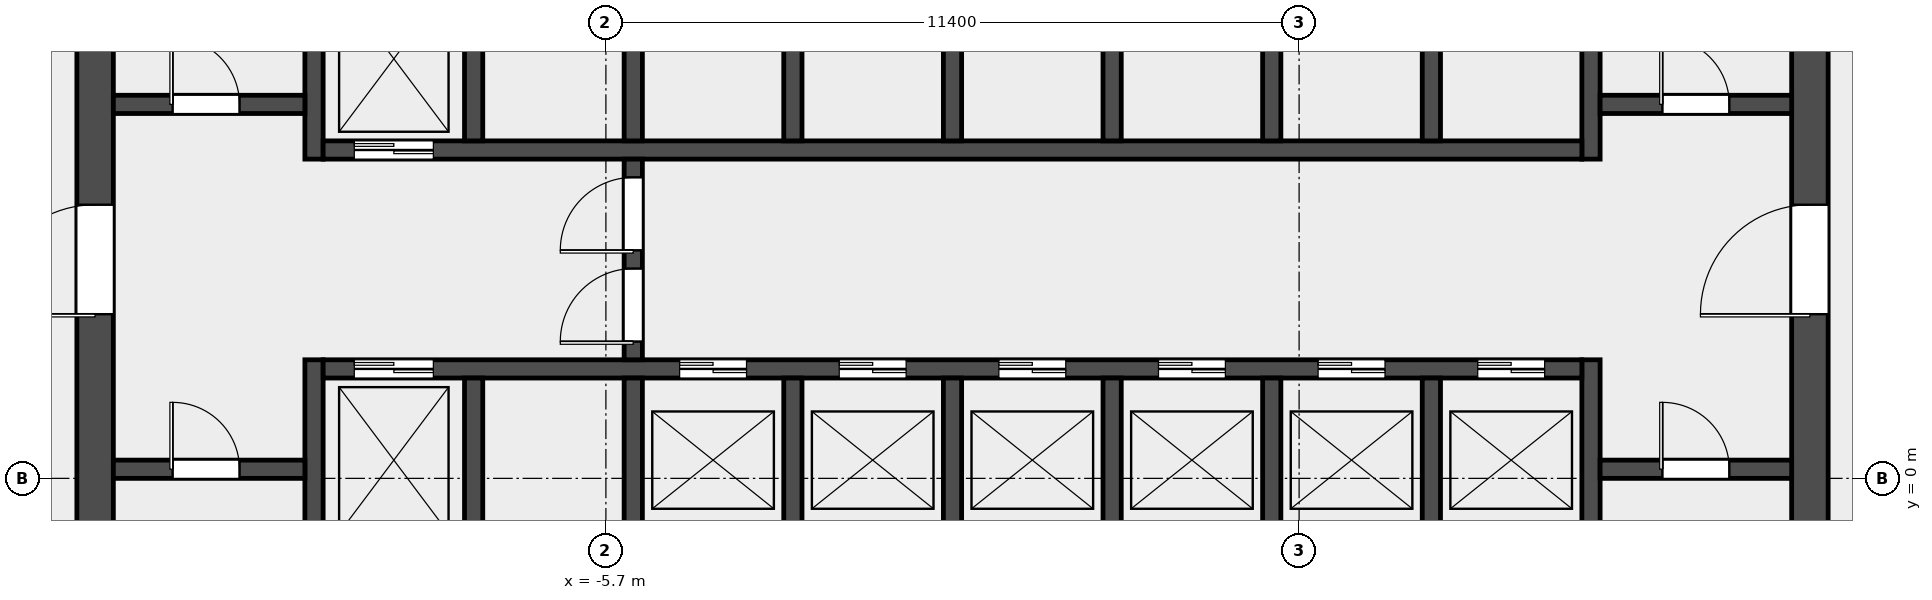
"""IFC4 building model, lengths in metres.
Left out: names, types, materials, properties, quantities, classifications, styles, units other than length and angle.
Written with IfcOpenShell. Run it as: python <this file> out.ifc"""

import sys

from ifc_helpers import new_model, si_unit, direction, frame, frame_2d, origin, place, context, subcontext, project, spatial, rectangle, extrude, element, fill, save


model = new_model("IFC4")
c1 = context("Model", 3, precision=1e-05, world=origin(), true_north=direction((0.0, 1.0)))
c2 = subcontext(c1, "Body", "Model", "MODEL_VIEW")
j1 = project(units=[si_unit("LENGTHUNIT", "METRE"), si_unit("PLANEANGLEUNIT", "RADIAN")], contexts=[c1])
p1 = place(None, origin())
s1 = spatial("IfcSite", under=j1, at=p1, CompositionType="ELEMENT")
p2 = place(p1, origin())
s2 = spatial("IfcBuilding", under=s1, at=p2, CompositionType="ELEMENT")
p3 = place(p2, frame((0.0, 0.0, 35.8)))
s3 = spatial("IfcBuildingStorey", under=s2, at=p3, CompositionType="ELEMENT", Elevation=35.8)
p4 = place(p3, frame((-14.1, -6.6, 0.0), z_axis=(0.0, 0.0, 1.0), x_axis=(0.0, 1.0, 0.0)))
e1 = element("IfcWall", 1, at=p4, inside=s3, PredefinedType="SHEAR", context=c2, shape_type="SweptSolid", body=[
    extrude(rectangle(XDim=19.5, YDim=0.6, at=frame_2d((9.75, 0.0))), origin(), (0.0, 0.0, 1.0), 4.5),
])
p5 = place(p4, frame((9.3, 0.0, 0.0)))
e2 = element("IfcOpeningElement", 2, at=p5, cuts=e1, PredefinedType="OPENING", context=c2, shape_type="SweptSolid", body=[
    extrude(rectangle(XDim=1.8, YDim=2.1, at=frame_2d((0.9, 1.05))), frame((0.0, 0.312, 0.0), z_axis=(0.0, -1.0, 0.0), x_axis=(1.0, 0.0, 0.0)), (0.0, 0.0, 1.0), 0.624),
])
p6 = place(p3, frame((14.1, -6.6, 0.0), z_axis=(0.0, 0.0, 1.0), x_axis=(0.0, 1.0, 0.0)))
e3 = element("IfcWall", 3, at=p6, inside=s3, PredefinedType="SHEAR", context=c2, shape_type="SweptSolid", body=[
    extrude(rectangle(XDim=19.5, YDim=0.6, at=frame_2d((9.75, 0.0))), origin(), (0.0, 0.0, 1.0), 4.5),
])
p7 = place(p6, frame((9.3, 0.0, 0.0)))
e4 = element("IfcOpeningElement", 4, at=p7, cuts=e3, PredefinedType="OPENING", context=c2, shape_type="SweptSolid", body=[
    extrude(rectangle(XDim=1.8, YDim=2.1, at=frame_2d((0.9, 1.05))), frame((0.0, 0.312, 0.0), z_axis=(0.0, -1.0, 0.0), x_axis=(1.0, 0.0, 0.0)), (0.0, 0.0, 1.0), 0.624),
])
p8 = place(p3, frame((-10.5, -6.6, 0.0), z_axis=(0.0, 0.0, 1.0), x_axis=(0.0, 1.0, 0.0)))
e5 = element("IfcWall", 5, at=p8, inside=s3, PredefinedType="SHEAR", context=c2, shape_type="SweptSolid", body=[
    extrude(rectangle(XDim=8.55, YDim=0.3, at=frame_2d((4.275, 0.0))), origin(), (0.0, 0.0, 1.0), 4.5),
])
p9 = place(p3, frame((-10.5, 5.25, 0.0), z_axis=(0.0, 0.0, 1.0), x_axis=(0.0, 1.0, 0.0)))
e6 = element("IfcWall", 6, at=p9, inside=s3, PredefinedType="SHEAR", context=c2, shape_type="SweptSolid", body=[
    extrude(rectangle(XDim=7.65, YDim=0.3, at=frame_2d((3.825, 0.0))), origin(), (0.0, 0.0, 1.0), 4.5),
])
p10 = place(p3, frame((10.5, -6.6, 0.0), z_axis=(0.0, 0.0, 1.0), x_axis=(0.0, 1.0, 0.0)))
e7 = element("IfcWall", 7, at=p10, inside=s3, PredefinedType="SHEAR", context=c2, shape_type="SweptSolid", body=[
    extrude(rectangle(XDim=8.55, YDim=0.3, at=frame_2d((4.275, 0.0))), origin(), (0.0, 0.0, 1.0), 4.5),
])
p11 = place(p3, frame((10.5, 5.25, 0.0), z_axis=(0.0, 0.0, 1.0), x_axis=(0.0, 1.0, 0.0)))
e8 = element("IfcWall", 8, at=p11, inside=s3, PredefinedType="SHEAR", context=c2, shape_type="SweptSolid", body=[
    extrude(rectangle(XDim=7.65, YDim=0.3, at=frame_2d((3.825, 0.0))), origin(), (0.0, 0.0, 1.0), 4.5),
])
p12 = place(p3, frame((-13.8, 0.15, 0.0), z_axis=(0.0, 0.0, 1.0), x_axis=(1.0, 0.0, 0.0)))
e9 = element("IfcWall", 9, at=p12, inside=s3, PredefinedType="SOLIDWALL", context=c2, shape_type="SweptSolid", body=[
    extrude(rectangle(XDim=3.15, YDim=0.3, at=frame_2d((1.575, 0.0))), origin(), (0.0, 0.0, 1.0), 4.5),
])
p13 = place(p12, frame((0.975, 0.0, 0.0)))
e10 = element("IfcOpeningElement", 10, at=p13, cuts=e9, PredefinedType="OPENING", context=c2, shape_type="SweptSolid", body=[
    extrude(rectangle(XDim=1.1, YDim=2.1, at=frame_2d((0.55, 1.05))), frame((0.0, 0.162, 0.0), z_axis=(0.0, -1.0, 0.0), x_axis=(1.0, 0.0, 0.0)), (0.0, 0.0, 1.0), 0.324),
])
p14 = place(p3, frame((-13.8, 6.15, 0.0), z_axis=(0.0, 0.0, 1.0), x_axis=(1.0, 0.0, 0.0)))
e11 = element("IfcWall", 11, at=p14, inside=s3, PredefinedType="SOLIDWALL", context=c2, shape_type="SweptSolid", body=[
    extrude(rectangle(XDim=3.15, YDim=0.3, at=frame_2d((1.575, 0.0))), origin(), (0.0, 0.0, 1.0), 4.5),
])
p15 = place(p14, frame((0.975, 0.0, 0.0)))
e12 = element("IfcOpeningElement", 12, at=p15, cuts=e11, PredefinedType="OPENING", context=c2, shape_type="SweptSolid", body=[
    extrude(rectangle(XDim=1.1, YDim=2.1, at=frame_2d((0.55, 1.05))), frame((0.0, 0.162, 0.0), z_axis=(0.0, -1.0, 0.0), x_axis=(1.0, 0.0, 0.0)), (0.0, 0.0, 1.0), 0.324),
])
p16 = place(p3, frame((10.65, 0.15, 0.0), z_axis=(0.0, 0.0, 1.0), x_axis=(1.0, 0.0, 0.0)))
e13 = element("IfcWall", 13, at=p16, inside=s3, PredefinedType="SOLIDWALL", context=c2, shape_type="SweptSolid", body=[
    extrude(rectangle(XDim=3.15, YDim=0.3, at=frame_2d((1.575, 0.0))), origin(), (0.0, 0.0, 1.0), 4.5),
])
p17 = place(p16, frame((1.025, 0.0, 0.0)))
e14 = element("IfcOpeningElement", 14, at=p17, cuts=e13, PredefinedType="OPENING", context=c2, shape_type="SweptSolid", body=[
    extrude(rectangle(XDim=1.1, YDim=2.1, at=frame_2d((0.55, 1.05))), frame((0.0, 0.162, 0.0), z_axis=(0.0, -1.0, 0.0), x_axis=(1.0, 0.0, 0.0)), (0.0, 0.0, 1.0), 0.324),
])
p18 = place(p3, frame((10.65, 6.15, 0.0), z_axis=(0.0, 0.0, 1.0), x_axis=(1.0, 0.0, 0.0)))
e15 = element("IfcWall", 15, at=p18, inside=s3, PredefinedType="SOLIDWALL", context=c2, shape_type="SweptSolid", body=[
    extrude(rectangle(XDim=3.15, YDim=0.3, at=frame_2d((1.575, 0.0))), origin(), (0.0, 0.0, 1.0), 4.5),
])
p19 = place(p18, frame((1.025, 0.0, 0.0)))
e16 = element("IfcOpeningElement", 16, at=p19, cuts=e15, PredefinedType="OPENING", context=c2, shape_type="SweptSolid", body=[
    extrude(rectangle(XDim=1.1, YDim=2.1, at=frame_2d((0.55, 1.05))), frame((0.0, 0.162, 0.0), z_axis=(0.0, -1.0, 0.0), x_axis=(1.0, 0.0, 0.0)), (0.0, 0.0, 1.0), 0.324),
])
p20 = place(p3, frame((-10.35, 1.8, 0.0), z_axis=(0.0, 0.0, 1.0), x_axis=(1.0, 0.0, 0.0)))
e17 = element("IfcWall", 17, at=p20, inside=s3, PredefinedType="SOLIDWALL", context=c2, shape_type="SweptSolid", body=[
    extrude(rectangle(XDim=20.7, YDim=0.3, at=frame_2d((10.35, 0.0))), origin(), (0.0, 0.0, 1.0), 4.5),
])
p21 = place(p20, frame((0.512, 0.0, 0.0)))
e18 = element("IfcOpeningElement", 18, at=p21, cuts=e17, PredefinedType="OPENING", context=c2, shape_type="SweptSolid", body=[
    extrude(rectangle(XDim=1.3, YDim=2.1, at=frame_2d((0.65, 1.05))), frame((0.0, 0.162, 0.0), z_axis=(0.0, -1.0, 0.0), x_axis=(1.0, 0.0, 0.0)), (0.0, 0.0, 1.0), 0.324),
])
p22 = place(p20, frame((5.863, 0.0, 0.0)))
e19 = element("IfcOpeningElement", 19, at=p22, cuts=e17, PredefinedType="OPENING", context=c2, shape_type="SweptSolid", body=[
    extrude(rectangle(XDim=1.1, YDim=2.1, at=frame_2d((0.55, 1.05))), frame((0.0, 0.162, 0.0), z_axis=(0.0, -1.0, 0.0), x_axis=(1.0, 0.0, 0.0)), (0.0, 0.0, 1.0), 0.324),
])
p23 = place(p20, frame((8.488, 0.0, 0.0)))
e20 = element("IfcOpeningElement", 20, at=p23, cuts=e17, PredefinedType="OPENING", context=c2, shape_type="SweptSolid", body=[
    extrude(rectangle(XDim=1.1, YDim=2.1, at=frame_2d((0.55, 1.05))), frame((0.0, 0.162, 0.0), z_axis=(0.0, -1.0, 0.0), x_axis=(1.0, 0.0, 0.0)), (0.0, 0.0, 1.0), 0.324),
])
p24 = place(p20, frame((11.113, 0.0, 0.0)))
e21 = element("IfcOpeningElement", 21, at=p24, cuts=e17, PredefinedType="OPENING", context=c2, shape_type="SweptSolid", body=[
    extrude(rectangle(XDim=1.1, YDim=2.1, at=frame_2d((0.55, 1.05))), frame((0.0, 0.162, 0.0), z_axis=(0.0, -1.0, 0.0), x_axis=(1.0, 0.0, 0.0)), (0.0, 0.0, 1.0), 0.324),
])
p25 = place(p20, frame((13.738, 0.0, 0.0)))
e22 = element("IfcOpeningElement", 22, at=p25, cuts=e17, PredefinedType="OPENING", context=c2, shape_type="SweptSolid", body=[
    extrude(rectangle(XDim=1.1, YDim=2.1, at=frame_2d((0.55, 1.05))), frame((0.0, 0.162, 0.0), z_axis=(0.0, -1.0, 0.0), x_axis=(1.0, 0.0, 0.0)), (0.0, 0.0, 1.0), 0.324),
])
p26 = place(p20, frame((16.363, 0.0, 0.0)))
e23 = element("IfcOpeningElement", 23, at=p26, cuts=e17, PredefinedType="OPENING", context=c2, shape_type="SweptSolid", body=[
    extrude(rectangle(XDim=1.1, YDim=2.1, at=frame_2d((0.55, 1.05))), frame((0.0, 0.162, 0.0), z_axis=(0.0, -1.0, 0.0), x_axis=(1.0, 0.0, 0.0)), (0.0, 0.0, 1.0), 0.324),
])
p27 = place(p20, frame((18.988, 0.0, 0.0)))
e24 = element("IfcOpeningElement", 24, at=p27, cuts=e17, PredefinedType="OPENING", context=c2, shape_type="SweptSolid", body=[
    extrude(rectangle(XDim=1.1, YDim=2.1, at=frame_2d((0.55, 1.05))), frame((0.0, 0.162, 0.0), z_axis=(0.0, -1.0, 0.0), x_axis=(1.0, 0.0, 0.0)), (0.0, 0.0, 1.0), 0.324),
])
p28 = place(p3, frame((-10.35, 5.4, 0.0), z_axis=(0.0, 0.0, 1.0), x_axis=(1.0, 0.0, 0.0)))
e25 = element("IfcWall", 25, at=p28, inside=s3, PredefinedType="SOLIDWALL", context=c2, shape_type="SweptSolid", body=[
    extrude(rectangle(XDim=20.7, YDim=0.3, at=frame_2d((10.35, 0.0))), origin(), (0.0, 0.0, 1.0), 4.5),
])
p29 = place(p28, frame((0.512, 0.0, 0.0)))
e26 = element("IfcOpeningElement", 26, at=p29, cuts=e25, PredefinedType="OPENING", context=c2, shape_type="SweptSolid", body=[
    extrude(rectangle(XDim=1.3, YDim=2.1, at=frame_2d((0.65, 1.05))), frame((0.0, 0.162, 0.0), z_axis=(0.0, -1.0, 0.0), x_axis=(1.0, 0.0, 0.0)), (0.0, 0.0, 1.0), 0.324),
])
for number, where, z_axis, x_axis in (
    (27, (-7.875, -1.05, 0.0), (0.0, 0.0, 1.0), (0.0, 1.0, 0.0)),
    (28, (-5.25, -1.05, 0.0), (0.0, 0.0, 1.0), (0.0, 1.0, 0.0)),
    (29, (-2.625, -1.05, 0.0), (0.0, 0.0, 1.0), (0.0, 1.0, 0.0)),
    (30, (0.0, -1.05, 0.0), (0.0, 0.0, 1.0), (0.0, 1.0, 0.0)),
    (31, (2.625, -1.05, 0.0), (0.0, 0.0, 1.0), (0.0, 1.0, 0.0)),
    (32, (5.25, -1.05, 0.0), (0.0, 0.0, 1.0), (0.0, 1.0, 0.0)),
    (33, (7.875, -1.05, 0.0), (0.0, 0.0, 1.0), (0.0, 1.0, 0.0)),
    (34, (-7.875, 5.55, 0.0), (0.0, 0.0, 1.0), (0.0, 1.0, 0.0)),
    (35, (-5.25, 5.55, 0.0), (0.0, 0.0, 1.0), (0.0, 1.0, 0.0)),
    (36, (-2.625, 5.55, 0.0), (0.0, 0.0, 1.0), (0.0, 1.0, 0.0)),
    (37, (0.0, 5.55, 0.0), (0.0, 0.0, 1.0), (0.0, 1.0, 0.0)),
    (38, (2.625, 5.55, 0.0), (0.0, 0.0, 1.0), (0.0, 1.0, 0.0)),
    (39, (5.25, 5.55, 0.0), (0.0, 0.0, 1.0), (0.0, 1.0, 0.0)),
    (40, (7.875, 5.55, 0.0), (0.0, 0.0, 1.0), (0.0, 1.0, 0.0)),
):
    element("IfcWall", number, at=place(p3, frame(where, z_axis=z_axis, x_axis=x_axis)), inside=s3, PredefinedType="SOLIDWALL", context=c2, shape_type="SweptSolid", body=[
        extrude(rectangle(XDim=2.7, YDim=0.3, at=frame_2d((1.35, 0.0))), origin(), (0.0, 0.0, 1.0), 4.5),
    ])
p30 = place(p3, frame((-5.25, 1.95, 0.0), z_axis=(0.0, 0.0, 1.0), x_axis=(0.0, 1.0, 0.0)))
e41 = element("IfcWall", 41, at=p30, inside=s3, PredefinedType="SOLIDWALL", context=c2, shape_type="SweptSolid", body=[
    extrude(rectangle(XDim=3.3, YDim=0.3, at=frame_2d((1.65, 0.0))), origin(), (0.0, 0.0, 1.0), 4.5),
])
p31 = place(p30, frame((0.3, 0.0, 0.0)))
e42 = element("IfcOpeningElement", 42, at=p31, cuts=e41, PredefinedType="OPENING", context=c2, shape_type="SweptSolid", body=[
    extrude(rectangle(XDim=1.2, YDim=2.1, at=frame_2d((0.6, 1.05))), frame((0.0, 0.162, 0.0), z_axis=(0.0, -1.0, 0.0), x_axis=(1.0, 0.0, 0.0)), (0.0, 0.0, 1.0), 0.324),
])
p32 = place(p30, frame((1.8, 0.0, 0.0)))
e43 = element("IfcOpeningElement", 43, at=p32, cuts=e41, PredefinedType="OPENING", context=c2, shape_type="SweptSolid", body=[
    extrude(rectangle(XDim=1.2, YDim=2.1, at=frame_2d((0.6, 1.05))), frame((0.0, 0.162, 0.0), z_axis=(0.0, -1.0, 0.0), x_axis=(1.0, 0.0, 0.0)), (0.0, 0.0, 1.0), 0.324),
])
p33 = place(p13, origin())
e44 = element("IfcDoor", 44, at=p33, inside=s3, OperationType="SINGLE_SWING_LEFT", PredefinedType="DOOR", context=c2, shape_type="SweptSolid", body=[
    extrude(rectangle(XDim=1.1, YDim=2.1, at=frame_2d((0.55, 1.05))), frame((0.0, 0.025, 0.0), z_axis=(0.0, -1.0, 0.0), x_axis=(1.0, 0.0, 0.0)), (0.0, 0.0, 1.0), 0.05),
])
fill(e10, e44)
p34 = place(p15, origin())
e45 = element("IfcDoor", 45, at=p34, inside=s3, OperationType="SINGLE_SWING_LEFT", PredefinedType="DOOR", context=c2, shape_type="SweptSolid", body=[
    extrude(rectangle(XDim=1.1, YDim=2.1, at=frame_2d((0.55, 1.05))), frame((0.0, 0.025, 0.0), z_axis=(0.0, -1.0, 0.0), x_axis=(1.0, 0.0, 0.0)), (0.0, 0.0, 1.0), 0.05),
])
fill(e12, e45)
p35 = place(p17, origin())
e46 = element("IfcDoor", 46, at=p35, inside=s3, OperationType="SINGLE_SWING_RIGHT", PredefinedType="DOOR", context=c2, shape_type="SweptSolid", body=[
    extrude(rectangle(XDim=1.1, YDim=2.1, at=frame_2d((0.55, 1.05))), frame((0.0, 0.025, 0.0), z_axis=(0.0, -1.0, 0.0), x_axis=(1.0, 0.0, 0.0)), (0.0, 0.0, 1.0), 0.05),
])
fill(e14, e46)
p36 = place(p19, origin())
e47 = element("IfcDoor", 47, at=p36, inside=s3, OperationType="SINGLE_SWING_RIGHT", PredefinedType="DOOR", context=c2, shape_type="SweptSolid", body=[
    extrude(rectangle(XDim=1.1, YDim=2.1, at=frame_2d((0.55, 1.05))), frame((0.0, 0.025, 0.0), z_axis=(0.0, -1.0, 0.0), x_axis=(1.0, 0.0, 0.0)), (0.0, 0.0, 1.0), 0.05),
])
fill(e16, e47)
p37 = place(p5, origin())
e48 = element("IfcDoor", 48, at=p37, inside=s3, OperationType="DOUBLE_DOOR_SINGLE_SWING", PredefinedType="DOOR", context=c2, shape_type="SweptSolid", body=[
    extrude(rectangle(XDim=1.8, YDim=2.1, at=frame_2d((0.9, 1.05))), frame((0.0, 0.025, 0.0), z_axis=(0.0, -1.0, 0.0), x_axis=(1.0, 0.0, 0.0)), (0.0, 0.0, 1.0), 0.05),
])
fill(e2, e48)
p38 = place(p7, origin())
e49 = element("IfcDoor", 49, at=p38, inside=s3, OperationType="DOUBLE_DOOR_SINGLE_SWING", PredefinedType="DOOR", context=c2, shape_type="SweptSolid", body=[
    extrude(rectangle(XDim=1.8, YDim=2.1, at=frame_2d((0.9, 1.05))), frame((0.0, 0.025, 0.0), z_axis=(0.0, -1.0, 0.0), x_axis=(1.0, 0.0, 0.0)), (0.0, 0.0, 1.0), 0.05),
])
fill(e4, e49)
p39 = place(p31, origin())
e50 = element("IfcDoor", 50, at=p39, inside=s3, OperationType="SINGLE_SWING_LEFT", PredefinedType="DOOR", context=c2, shape_type="SweptSolid", body=[
    extrude(rectangle(XDim=1.2, YDim=2.1, at=frame_2d((0.6, 1.05))), frame((0.0, 0.025, 0.0), z_axis=(0.0, -1.0, 0.0), x_axis=(1.0, 0.0, 0.0)), (0.0, 0.0, 1.0), 0.05),
])
fill(e42, e50)
p40 = place(p32, origin())
e51 = element("IfcDoor", 51, at=p40, inside=s3, OperationType="SINGLE_SWING_RIGHT", PredefinedType="DOOR", context=c2, shape_type="SweptSolid", body=[
    extrude(rectangle(XDim=1.2, YDim=2.1, at=frame_2d((0.6, 1.05))), frame((0.0, 0.025, 0.0), z_axis=(0.0, -1.0, 0.0), x_axis=(1.0, 0.0, 0.0)), (0.0, 0.0, 1.0), 0.05),
])
fill(e43, e51)
p41 = place(p21, origin())
e52 = element("IfcDoor", 52, at=p41, inside=s3, OperationType="DOUBLE_DOOR_SLIDING", PredefinedType="DOOR", context=c2, shape_type="SweptSolid", body=[
    extrude(rectangle(XDim=1.3, YDim=2.1, at=frame_2d((0.65, 1.05))), frame((0.0, 0.025, 0.0), z_axis=(0.0, -1.0, 0.0), x_axis=(1.0, 0.0, 0.0)), (0.0, 0.0, 1.0), 0.05),
])
fill(e18, e52)
p42 = place(p22, origin())
e53 = element("IfcDoor", 53, at=p42, inside=s3, OperationType="DOUBLE_DOOR_SLIDING", PredefinedType="DOOR", context=c2, shape_type="SweptSolid", body=[
    extrude(rectangle(XDim=1.1, YDim=2.1, at=frame_2d((0.55, 1.05))), frame((0.0, 0.025, 0.0), z_axis=(0.0, -1.0, 0.0), x_axis=(1.0, 0.0, 0.0)), (0.0, 0.0, 1.0), 0.05),
])
fill(e19, e53)
p43 = place(p23, origin())
e54 = element("IfcDoor", 54, at=p43, inside=s3, OperationType="DOUBLE_DOOR_SLIDING", PredefinedType="DOOR", context=c2, shape_type="SweptSolid", body=[
    extrude(rectangle(XDim=1.1, YDim=2.1, at=frame_2d((0.55, 1.05))), frame((0.0, 0.025, 0.0), z_axis=(0.0, -1.0, 0.0), x_axis=(1.0, 0.0, 0.0)), (0.0, 0.0, 1.0), 0.05),
])
fill(e20, e54)
p44 = place(p24, origin())
e55 = element("IfcDoor", 55, at=p44, inside=s3, OperationType="DOUBLE_DOOR_SLIDING", PredefinedType="DOOR", context=c2, shape_type="SweptSolid", body=[
    extrude(rectangle(XDim=1.1, YDim=2.1, at=frame_2d((0.55, 1.05))), frame((0.0, 0.025, 0.0), z_axis=(0.0, -1.0, 0.0), x_axis=(1.0, 0.0, 0.0)), (0.0, 0.0, 1.0), 0.05),
])
fill(e21, e55)
p45 = place(p25, origin())
e56 = element("IfcDoor", 56, at=p45, inside=s3, OperationType="DOUBLE_DOOR_SLIDING", PredefinedType="DOOR", context=c2, shape_type="SweptSolid", body=[
    extrude(rectangle(XDim=1.1, YDim=2.1, at=frame_2d((0.55, 1.05))), frame((0.0, 0.025, 0.0), z_axis=(0.0, -1.0, 0.0), x_axis=(1.0, 0.0, 0.0)), (0.0, 0.0, 1.0), 0.05),
])
fill(e22, e56)
p46 = place(p26, origin())
e57 = element("IfcDoor", 57, at=p46, inside=s3, OperationType="DOUBLE_DOOR_SLIDING", PredefinedType="DOOR", context=c2, shape_type="SweptSolid", body=[
    extrude(rectangle(XDim=1.1, YDim=2.1, at=frame_2d((0.55, 1.05))), frame((0.0, 0.025, 0.0), z_axis=(0.0, -1.0, 0.0), x_axis=(1.0, 0.0, 0.0)), (0.0, 0.0, 1.0), 0.05),
])
fill(e23, e57)
p47 = place(p27, origin())
e58 = element("IfcDoor", 58, at=p47, inside=s3, OperationType="DOUBLE_DOOR_SLIDING", PredefinedType="DOOR", context=c2, shape_type="SweptSolid", body=[
    extrude(rectangle(XDim=1.1, YDim=2.1, at=frame_2d((0.55, 1.05))), frame((0.0, 0.025, 0.0), z_axis=(0.0, -1.0, 0.0), x_axis=(1.0, 0.0, 0.0)), (0.0, 0.0, 1.0), 0.05),
])
fill(e24, e58)
p48 = place(p29, origin())
e59 = element("IfcDoor", 59, at=p48, inside=s3, OperationType="DOUBLE_DOOR_SLIDING", PredefinedType="DOOR", context=c2, shape_type="SweptSolid", body=[
    extrude(rectangle(XDim=1.3, YDim=2.1, at=frame_2d((0.65, 1.05))), frame((0.0, 0.025, 0.0), z_axis=(0.0, -1.0, 0.0), x_axis=(1.0, 0.0, 0.0)), (0.0, 0.0, 1.0), 0.05),
])
fill(e26, e59)
save(model, sys.argv[1])
